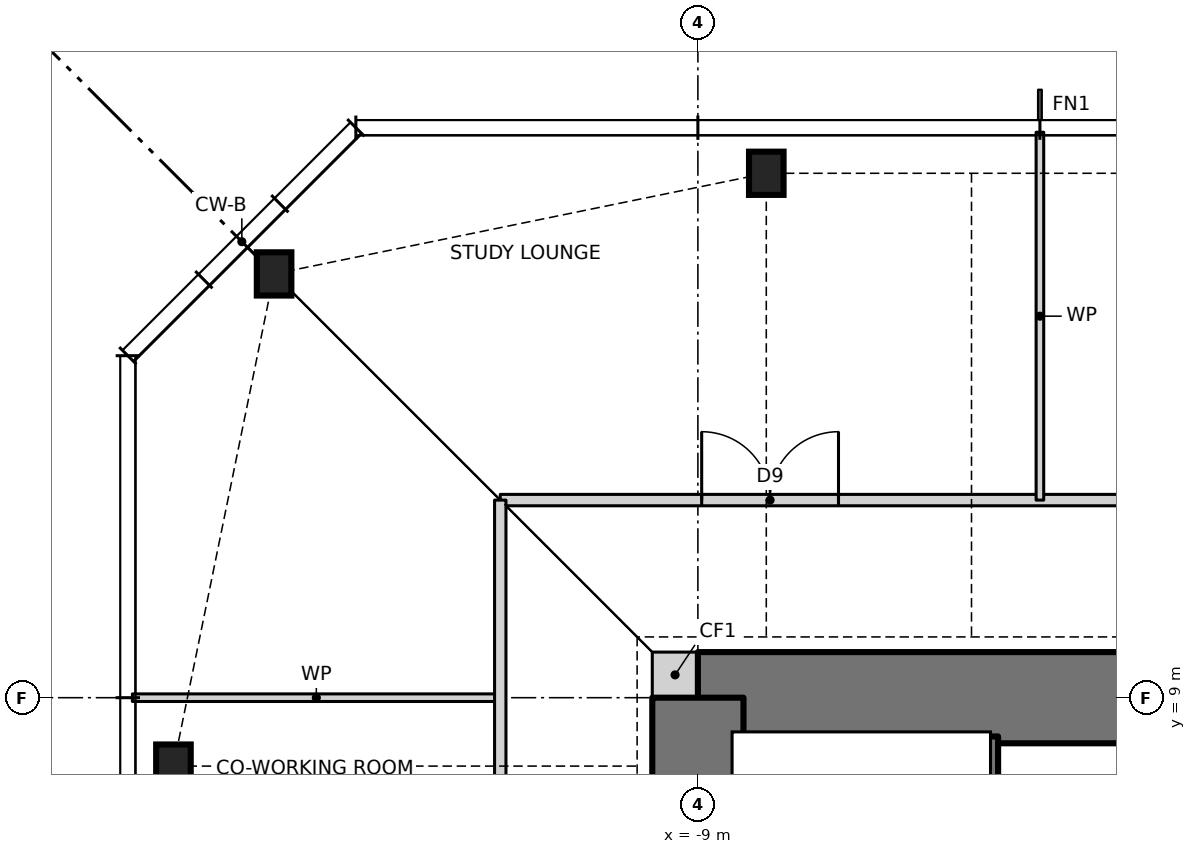
"""IFC4 building model, lengths in metres.
Left out: names, types, materials, properties, quantities, classifications, styles, units other than length and angle.
Written with IfcOpenShell. Run it as: python <this file> out.ifc"""

import sys

from ifc_helpers import new_model, si_unit, direction, frame, frame_2d, origin, origin_2d, place, context, subcontext, project, spatial, rectangle, i_section, extrude, element, fill, save


model = new_model("IFC4")
c1 = context("Model", 3, precision=1e-05, world=origin(), true_north=direction((0.0, 1.0)))
c2 = subcontext(c1, "Body", "Model", "MODEL_VIEW")
j1 = project(units=[si_unit("LENGTHUNIT", "METRE"), si_unit("PLANEANGLEUNIT", "RADIAN")], contexts=[c1])
p1 = place(None, origin())
s1 = spatial("IfcSite", under=j1, at=p1, CompositionType="ELEMENT")
p2 = place(p1, origin())
s2 = spatial("IfcBuilding", under=s1, at=p2, CompositionType="ELEMENT")
p3 = place(p2, frame((0.0, 0.0, 257.0)))
s3 = spatial("IfcBuildingStorey", under=s2, at=p3, CompositionType="ELEMENT", Elevation=257.0)
for number, where, z_axis, x_axis in (
    (1, (-8.1, 15.9, 0.0), (0.0, 0.0, 1.0), (1.0, 0.0, 0.0)),
    (2, (-14.576, 14.576, 0.0), (0.0, 0.0, 1.0), (1.0, 0.0, 0.0)),
    (3, (-15.9, 8.1, 0.0), (0.0, 0.0, 1.0), (1.0, 0.0, 0.0)),
):
    element("IfcColumn", number, at=place(p3, frame(where, z_axis=z_axis, x_axis=x_axis)), inside=s3, PredefinedType="COLUMN", context=c2, shape_type="SweptSolid", body=[
        extrude(i_section(OverallWidth=0.455, OverallDepth=0.569, WebThickness=0.078, FlangeThickness=0.125, at=origin_2d()), origin(), (0.0, 0.0, 1.0), 3.5),
    ])
p4 = place(p3, frame((-9.6, 9.3, 0.0), z_axis=(0.0, 0.0, 1.0), x_axis=(1.0, 0.0, 0.0)))
e4 = element("IfcWall", 4, at=p4, inside=s3, PredefinedType="SOLIDWALL", context=c2, shape_type="SweptSolid", body=[
    extrude(rectangle(XDim=0.6, YDim=0.6, at=frame_2d((0.3, 0.0))), origin(), (0.0, 0.0, 1.0), 3.5),
])
p5 = place(p3, frame((9.0, 9.0, 0.0), z_axis=(0.0, 0.0, 1.0), x_axis=(-1.0, 0.0, 0.0)))
e5 = element("IfcWall", 5, at=p5, inside=s3, PredefinedType="SHEAR", context=c2, shape_type="SweptSolid", body=[
    extrude(rectangle(XDim=18.0, YDim=1.2, at=frame_2d((9.0, 0.0))), origin(), (0.0, 0.0, 1.0), 3.5),
])
p6 = place(p5, frame((11.125, 0.0, 0.0)))
e6 = element("IfcOpeningElement", 6, at=p6, cuts=e5, PredefinedType="OPENING", context=c2, shape_type="SweptSolid", body=[
    extrude(rectangle(XDim=0.9, YDim=2.1, at=frame_2d((0.45, 1.05))), frame((0.0, 0.61, 0.0), z_axis=(0.0, -1.0, 0.0), x_axis=(1.0, 0.0, 0.0)), (0.0, 0.0, 1.0), 1.22),
])
p7 = place(p5, frame((4.275, 0.0, 0.0)))
e7 = element("IfcOpeningElement", 7, at=p7, cuts=e5, PredefinedType="OPENING", context=c2, shape_type="SweptSolid", body=[
    extrude(rectangle(XDim=0.9, YDim=2.1, at=frame_2d((0.45, 1.05))), frame((0.0, 0.61, 0.0), z_axis=(0.0, -1.0, 0.0), x_axis=(1.0, 0.0, 0.0)), (0.0, 0.0, 1.0), 1.22),
])
p8 = place(p3, frame((-9.0, 9.0, 0.0), z_axis=(0.0, 0.0, 1.0), x_axis=(0.0, -1.0, 0.0)))
e8 = element("IfcWall", 8, at=p8, inside=s3, PredefinedType="SHEAR", context=c2, shape_type="SweptSolid", body=[
    extrude(rectangle(XDim=18.0, YDim=1.2, at=frame_2d((9.0, 0.0))), origin(), (0.0, 0.0, 1.0), 3.5),
])
p9 = place(p8, frame((8.5, 0.0, 0.0)))
e9 = element("IfcOpeningElement", 9, at=p9, cuts=e8, PredefinedType="OPENING", context=c2, shape_type="SweptSolid", body=[
    extrude(rectangle(XDim=1.0, YDim=2.1, at=frame_2d((0.5, 1.05))), frame((0.0, 0.61, 0.0), z_axis=(0.0, -1.0, 0.0), x_axis=(1.0, 0.0, 0.0)), (0.0, 0.0, 1.0), 1.22),
])
p10 = place(p3, frame((-16.44, 9.0, 0.0), z_axis=(0.0, 0.0, 1.0), x_axis=(1.0, 0.0, 0.0)))
e10 = element("IfcWall", 10, at=p10, inside=s3, PredefinedType="PARTITIONING", context=c2, shape_type="SweptSolid", body=[
    extrude(rectangle(XDim=4.84, YDim=0.1, at=frame_2d((2.42, 0.0))), origin(), (0.0, 0.0, 1.0), 3.27),
])
p11 = place(p3, frame((-11.6, 11.6, 0.0), z_axis=(0.0, 0.0, 1.0), x_axis=(1.0, 0.0, 0.0)))
e11 = element("IfcWall", 11, at=p11, inside=s3, PredefinedType="PARTITIONING", context=c2, shape_type="SweptSolid", body=[
    extrude(rectangle(XDim=23.2, YDim=0.15, at=frame_2d((11.6, 0.0))), origin(), (0.0, 0.0, 1.0), 3.27),
])
p12 = place(p11, frame((14.7, 0.0, 0.0)))
e12 = element("IfcOpeningElement", 12, at=p12, cuts=e11, PredefinedType="OPENING", context=c2, shape_type="SweptSolid", body=[
    extrude(rectangle(XDim=1.0, YDim=2.1, at=frame_2d((0.5, 1.05))), frame((0.0, 0.085, 0.0), z_axis=(0.0, -1.0, 0.0), x_axis=(1.0, 0.0, 0.0)), (0.0, 0.0, 1.0), 0.17),
])
p13 = place(p11, frame((2.65, 0.0, 0.0)))
e13 = element("IfcOpeningElement", 13, at=p13, cuts=e11, PredefinedType="OPENING", context=c2, shape_type="SweptSolid", body=[
    extrude(rectangle(XDim=1.8, YDim=2.1, at=frame_2d((0.9, 1.05))), frame((0.0, 0.085, 0.0), z_axis=(0.0, -1.0, 0.0), x_axis=(1.0, 0.0, 0.0)), (0.0, 0.0, 1.0), 0.17),
])
p14 = place(p3, frame((-4.5, 11.6, 0.0), z_axis=(0.0, 0.0, 1.0), x_axis=(0.0, 1.0, 0.0)))
e14 = element("IfcWall", 14, at=p14, inside=s3, PredefinedType="PARTITIONING", context=c2, shape_type="SweptSolid", body=[
    extrude(rectangle(XDim=4.84, YDim=0.1, at=frame_2d((2.42, 0.0))), origin(), (0.0, 0.0, 1.0), 3.27),
])
p15 = place(p3, frame((-5.15, 1.6, 0.0), z_axis=(0.0, 0.0, 1.0), x_axis=(0.0, 1.0, 0.0)))
e15 = element("IfcWall", 15, at=p15, inside=s3, PredefinedType="SOLIDWALL", context=c2, shape_type="SweptSolid", body=[
    extrude(rectangle(XDim=6.89, YDim=0.2, at=frame_2d((3.445, 0.0))), origin(), (0.0, 0.0, 1.0), 3.5),
])
p16 = place(p3, frame((-11.6, -11.6, 0.0), z_axis=(0.0, 0.0, 1.0), x_axis=(0.0, 1.0, 0.0)))
e16 = element("IfcWall", 16, at=p16, inside=s3, PredefinedType="PARTITIONING", context=c2, shape_type="SweptSolid", body=[
    extrude(rectangle(XDim=23.2, YDim=0.15, at=frame_2d((11.6, 0.0))), origin(), (0.0, 0.0, 1.0), 3.27),
])
p17 = place(p16, frame((17.45, 0.0, 0.0)))
e17 = element("IfcOpeningElement", 17, at=p17, cuts=e16, PredefinedType="OPENING", context=c2, shape_type="SweptSolid", body=[
    extrude(rectangle(XDim=1.8, YDim=2.1, at=frame_2d((0.9, 1.05))), frame((0.0, 0.085, 0.0), z_axis=(0.0, -1.0, 0.0), x_axis=(1.0, 0.0, 0.0)), (0.0, 0.0, 1.0), 0.17),
])
p18 = place(p16, frame((12.0, 0.0, 0.0)))
e18 = element("IfcOpeningElement", 18, at=p18, cuts=e16, PredefinedType="OPENING", context=c2, shape_type="SweptSolid", body=[
    extrude(rectangle(XDim=1.0, YDim=2.1, at=frame_2d((0.5, 1.05))), frame((0.0, 0.085, 0.0), z_axis=(0.0, -1.0, 0.0), x_axis=(1.0, 0.0, 0.0)), (0.0, 0.0, 1.0), 0.17),
])
p19 = place(p16, frame((2.65, 0.0, 0.0)))
e19 = element("IfcOpeningElement", 19, at=p19, cuts=e16, PredefinedType="OPENING", context=c2, shape_type="SweptSolid", body=[
    extrude(rectangle(XDim=1.8, YDim=2.1, at=frame_2d((0.9, 1.05))), frame((0.0, 0.085, 0.0), z_axis=(0.0, -1.0, 0.0), x_axis=(1.0, 0.0, 0.0)), (0.0, 0.0, 1.0), 0.17),
])
p20 = place(p13, origin())
e20 = element("IfcDoor", 20, at=p20, inside=s3, OperationType="DOUBLE_DOOR_SINGLE_SWING", PredefinedType="DOOR", context=c2, shape_type="SweptSolid", body=[
    extrude(rectangle(XDim=1.8, YDim=2.1, at=frame_2d((0.9, 1.05))), frame((0.0, 0.025, 0.0), z_axis=(0.0, -1.0, 0.0), x_axis=(1.0, 0.0, 0.0)), (0.0, 0.0, 1.0), 0.05),
])
fill(e13, e20)
save(model, sys.argv[1])
